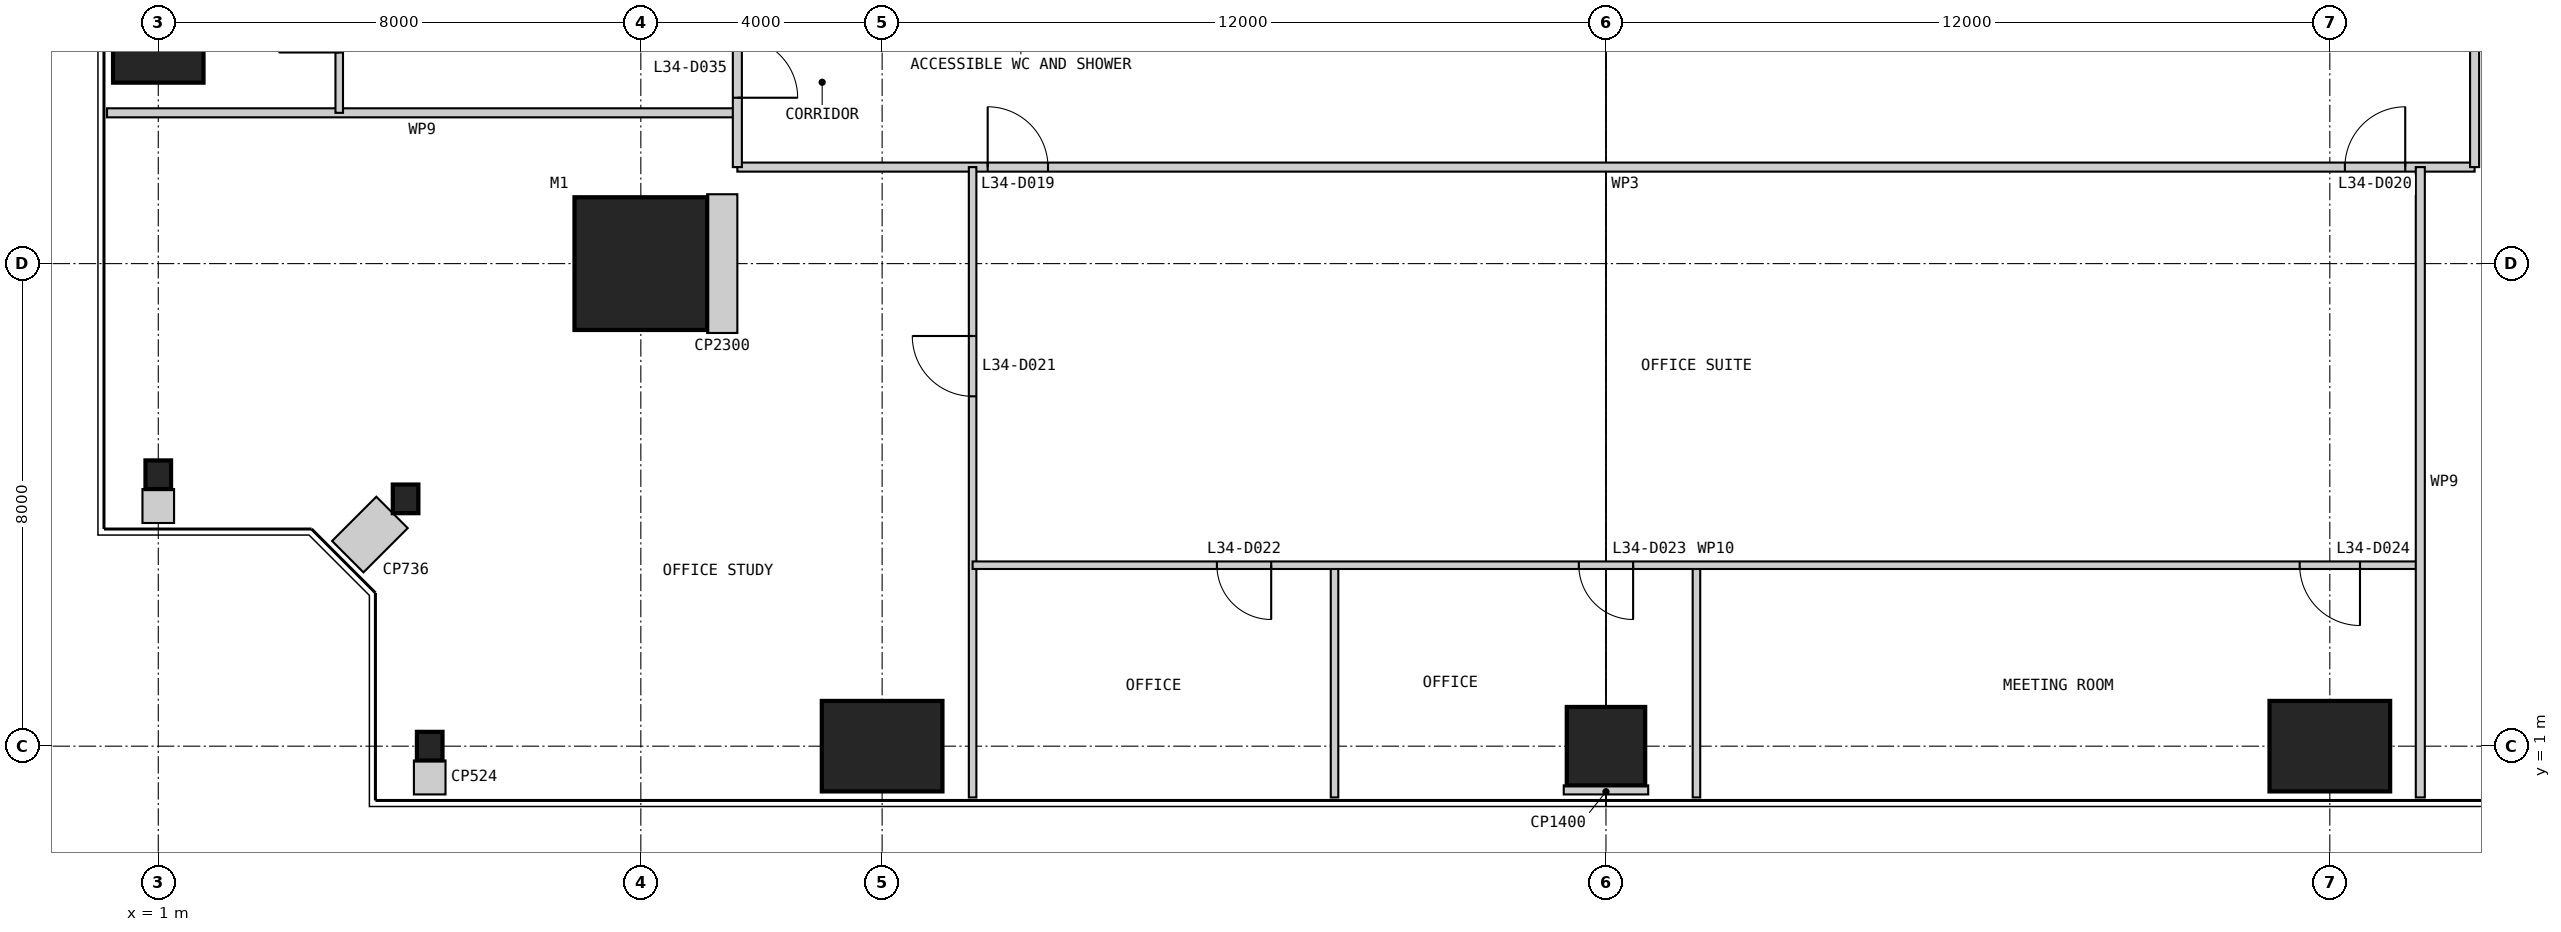
"""IFC4 building model, lengths in metres.
Left out: names, types, materials, properties, quantities, classifications, styles, units other than length and angle.
Written with IfcOpenShell. Run it as: python <this file> out.ifc"""

import sys

from ifc_helpers import new_model, si_unit, direction, frame, frame_2d, origin, origin_2d, place, context, subcontext, project, spatial, rectangle, i_section, extrude, element, fill, save


model = new_model("IFC4")
c1 = context("Model", 3, precision=1e-05, world=origin(), true_north=direction((0.0, 1.0)))
c2 = subcontext(c1, "Body", "Model", "MODEL_VIEW")
j1 = project(units=[si_unit("LENGTHUNIT", "METRE"), si_unit("PLANEANGLEUNIT", "RADIAN")], contexts=[c1])
p1 = place(None, origin())
s1 = spatial("IfcSite", under=j1, at=p1, CompositionType="ELEMENT")
p2 = place(p1, origin())
s2 = spatial("IfcBuilding", under=s1, at=p2, CompositionType="ELEMENT")
p3 = place(p2, frame((0.0, 0.0, 146.4)))
s3 = spatial("IfcBuildingStorey", under=s2, at=p3, CompositionType="ELEMENT", Elevation=146.4)
p4 = place(p3, frame((9.0, 9.0, 0.0), z_axis=(0.0, 0.0, 1.0), x_axis=(1.0, 0.0, 0.0)))
e1 = element("IfcColumn", 1, at=p4, inside=s3, PredefinedType="COLUMN", context=c2, shape_type="SweptSolid", body=[
    extrude(rectangle(XDim=2.2, YDim=2.2, at=origin_2d()), origin(), (0.0, 0.0, 1.0), 4.0),
])
p5 = place(p3, frame((5.5, 1.0, 0.0), z_axis=(0.0, 0.0, 1.0), x_axis=(1.0, 0.0, 0.0)))
e2 = element("IfcColumn", 2, at=p5, inside=s3, PredefinedType="COLUMN", context=c2, shape_type="SweptSolid", body=[
    extrude(i_section(OverallWidth=0.424, OverallDepth=0.475, WebThickness=0.048, FlangeThickness=0.077, at=origin_2d()), origin(), (0.0, 0.0, 1.0), 4.0),
])
p6 = place(p3, frame((13.0, 1.0, 0.0), z_axis=(0.0, 0.0, 1.0), x_axis=(1.0, 0.0, 0.0)))
e3 = element("IfcColumn", 3, at=p6, inside=s3, PredefinedType="COLUMN", context=c2, shape_type="SweptSolid", body=[
    extrude(rectangle(XDim=2.0, YDim=1.5, at=origin_2d()), origin(), (0.0, 0.0, 1.0), 4.0),
])
p7 = place(p3, frame((25.0, 1.0, 0.0), z_axis=(0.0, 0.0, 1.0), x_axis=(1.0, 0.0, 0.0)))
e4 = element("IfcColumn", 4, at=p7, inside=s3, PredefinedType="COLUMN", context=c2, shape_type="SweptSolid", body=[
    extrude(rectangle(XDim=1.3, YDim=1.3, at=origin_2d()), origin(), (0.0, 0.0, 1.0), 4.0),
])
p8 = place(p3, frame((37.0, 1.0, 0.0), z_axis=(0.0, 0.0, 1.0), x_axis=(1.0, 0.0, 0.0)))
e5 = element("IfcColumn", 5, at=p8, inside=s3, PredefinedType="COLUMN", context=c2, shape_type="SweptSolid", body=[
    extrude(rectangle(XDim=2.0, YDim=1.5, at=origin_2d()), origin(), (0.0, 0.0, 1.0), 4.0),
])
p9 = place(p3, frame((1.0, 13.0, 0.0), z_axis=(0.0, 0.0, 1.0), x_axis=(1.0, 0.0, 0.0)))
e6 = element("IfcColumn", 6, at=p9, inside=s3, PredefinedType="COLUMN", context=c2, shape_type="SweptSolid", body=[
    extrude(rectangle(XDim=1.5, YDim=2.0, at=origin_2d()), origin(), (0.0, 0.0, 1.0), 4.0),
])
for number, where, z_axis, x_axis in (
    (7, (1.0, 5.5, 0.0), (0.0, 0.0, 1.0), (1.0, 0.0, 0.0)),
    (8, (5.1, 5.1, 0.0), (0.0, 0.0, 1.0), (1.0, 0.0, 0.0)),
):
    element("IfcColumn", number, at=place(p3, frame(where, z_axis=z_axis, x_axis=x_axis)), inside=s3, PredefinedType="COLUMN", context=c2, shape_type="SweptSolid", body=[
        extrude(i_section(OverallWidth=0.424, OverallDepth=0.475, WebThickness=0.048, FlangeThickness=0.077, at=origin_2d()), origin(), (0.0, 0.0, 1.0), 4.0),
    ])
p10 = place(p3, frame((10.6, 10.6, 0.0), z_axis=(0.0, 0.0, 1.0), x_axis=(1.0, 0.0, 0.0)))
e9 = element("IfcWall", 9, at=p10, inside=s3, PredefinedType="PARTITIONING", context=c2, shape_type="SweptSolid", body=[
    extrude(rectangle(XDim=28.8, YDim=0.15, at=frame_2d((14.4, 0.0))), origin(), (0.0, 0.0, 1.0), 3.85),
])
p11 = place(p10, frame((4.15, 0.0, 0.0)))
e10 = element("IfcOpeningElement", 10, at=p11, cuts=e9, PredefinedType="OPENING", context=c2, shape_type="SweptSolid", body=[
    extrude(rectangle(XDim=1.0, YDim=2.2, at=frame_2d((0.5, 1.1))), frame((0.0, 0.085, 0.0), z_axis=(0.0, -1.0, 0.0), x_axis=(1.0, 0.0, 0.0)), (0.0, 0.0, 1.0), 0.17),
])
p12 = place(p10, frame((26.65, 0.0, 0.0)))
e11 = element("IfcOpeningElement", 11, at=p12, cuts=e9, PredefinedType="OPENING", context=c2, shape_type="SweptSolid", body=[
    extrude(rectangle(XDim=1.0, YDim=2.2, at=frame_2d((0.5, 1.1))), frame((0.0, 0.085, 0.0), z_axis=(0.0, -1.0, 0.0), x_axis=(1.0, 0.0, 0.0)), (0.0, 0.0, 1.0), 0.17),
])
p13 = place(p3, frame((0.15, 11.5, 0.0), z_axis=(0.0, 0.0, 1.0), x_axis=(1.0, 0.0, 0.0)))
e12 = element("IfcWall", 12, at=p13, inside=s3, PredefinedType="PARTITIONING", context=c2, shape_type="SweptSolid", body=[
    extrude(rectangle(XDim=10.45, YDim=0.15, at=frame_2d((5.225, 0.0))), origin(), (0.0, 0.0, 1.0), 3.85),
])
p14 = place(p3, frame((14.5, 0.15, 0.0), z_axis=(0.0, 0.0, 1.0), x_axis=(0.0, 1.0, 0.0)))
e13 = element("IfcWall", 13, at=p14, inside=s3, PredefinedType="PARTITIONING", context=c2, shape_type="SweptSolid", body=[
    extrude(rectangle(XDim=10.45, YDim=0.125, at=frame_2d((5.225, 0.0))), origin(), (0.0, 0.0, 1.0), 3.85),
])
p15 = place(p14, frame((6.65, 0.0, 0.0)))
e14 = element("IfcOpeningElement", 14, at=p15, cuts=e13, PredefinedType="OPENING", context=c2, shape_type="SweptSolid", body=[
    extrude(rectangle(XDim=1.0, YDim=2.2, at=frame_2d((0.5, 1.1))), frame((0.0, 0.073, 0.0), z_axis=(0.0, -1.0, 0.0), x_axis=(1.0, 0.0, 0.0)), (0.0, 0.0, 1.0), 0.145),
])
for number, where, z_axis, x_axis in (
    (15, (20.5, 0.15, 0.0), (0.0, 0.0, 1.0), (0.0, 1.0, 0.0)),
    (16, (26.5, 0.15, 0.0), (0.0, 0.0, 1.0), (0.0, 1.0, 0.0)),
):
    element("IfcWall", number, at=place(p3, frame(where, z_axis=z_axis, x_axis=x_axis)), inside=s3, PredefinedType="PARTITIONING", context=c2, shape_type="SweptSolid", body=[
        extrude(rectangle(XDim=3.85, YDim=0.125, at=frame_2d((1.925, 0.0))), origin(), (0.0, 0.0, 1.0), 3.85),
    ])
p16 = place(p3, frame((14.5, 4.0, 0.0), z_axis=(0.0, 0.0, 1.0), x_axis=(1.0, 0.0, 0.0)))
e17 = element("IfcWall", 17, at=p16, inside=s3, PredefinedType="PARTITIONING", context=c2, shape_type="SweptSolid", body=[
    extrude(rectangle(XDim=24.0, YDim=0.125, at=frame_2d((12.0, 0.0))), origin(), (0.0, 0.0, 1.0), 3.85),
])
p17 = place(p16, frame((4.05, 0.0, 0.0)))
e18 = element("IfcOpeningElement", 18, at=p17, cuts=e17, PredefinedType="OPENING", context=c2, shape_type="SweptSolid", body=[
    extrude(rectangle(XDim=0.9, YDim=2.2, at=frame_2d((0.45, 1.1))), frame((0.0, 0.073, 0.0), z_axis=(0.0, -1.0, 0.0), x_axis=(1.0, 0.0, 0.0)), (0.0, 0.0, 1.0), 0.145),
])
p18 = place(p16, frame((10.05, 0.0, 0.0)))
e19 = element("IfcOpeningElement", 19, at=p18, cuts=e17, PredefinedType="OPENING", context=c2, shape_type="SweptSolid", body=[
    extrude(rectangle(XDim=0.9, YDim=2.2, at=frame_2d((0.45, 1.1))), frame((0.0, 0.073, 0.0), z_axis=(0.0, -1.0, 0.0), x_axis=(1.0, 0.0, 0.0)), (0.0, 0.0, 1.0), 0.145),
])
p19 = place(p16, frame((22.0, 0.0, 0.0)))
e20 = element("IfcOpeningElement", 20, at=p19, cuts=e17, PredefinedType="OPENING", context=c2, shape_type="SweptSolid", body=[
    extrude(rectangle(XDim=1.0, YDim=2.2, at=frame_2d((0.5, 1.1))), frame((0.0, 0.073, 0.0), z_axis=(0.0, -1.0, 0.0), x_axis=(1.0, 0.0, 0.0)), (0.0, 0.0, 1.0), 0.145),
])
p20 = place(p3, frame((39.4, 10.6, 0.0), z_axis=(0.0, 0.0, 1.0), x_axis=(0.0, 1.0, 0.0)))
e21 = element("IfcWall", 21, at=p20, inside=s3, PredefinedType="PARTITIONING", context=c2, shape_type="SweptSolid", body=[
    extrude(rectangle(XDim=27.9, YDim=0.15, at=frame_2d((13.95, 0.0))), origin(), (0.0, 0.0, 1.0), 3.85),
])
p21 = place(p20, frame((4.15, 0.0, 0.0)))
e22 = element("IfcOpeningElement", 22, at=p21, cuts=e21, PredefinedType="OPENING", context=c2, shape_type="SweptSolid", body=[
    extrude(rectangle(XDim=1.0, YDim=2.2, at=frame_2d((0.5, 1.1))), frame((0.0, 0.085, 0.0), z_axis=(0.0, -1.0, 0.0), x_axis=(1.0, 0.0, 0.0)), (0.0, 0.0, 1.0), 0.17),
])
p22 = place(p20, frame((23.65, 0.0, 0.0)))
e23 = element("IfcOpeningElement", 23, at=p22, cuts=e21, PredefinedType="OPENING", context=c2, shape_type="SweptSolid", body=[
    extrude(rectangle(XDim=1.0, YDim=2.2, at=frame_2d((0.5, 1.1))), frame((0.0, 0.085, 0.0), z_axis=(0.0, -1.0, 0.0), x_axis=(1.0, 0.0, 0.0)), (0.0, 0.0, 1.0), 0.17),
])
p23 = place(p3, frame((38.5, 0.15, 0.0), z_axis=(0.0, 0.0, 1.0), x_axis=(0.0, 1.0, 0.0)))
e24 = element("IfcWall", 24, at=p23, inside=s3, PredefinedType="PARTITIONING", context=c2, shape_type="SweptSolid", body=[
    extrude(rectangle(XDim=10.45, YDim=0.15, at=frame_2d((5.225, 0.0))), origin(), (0.0, 0.0, 1.0), 3.85),
])
p24 = place(p3, frame((10.6, 38.5, 0.0), z_axis=(0.0, 0.0, 1.0), x_axis=(0.0, -1.0, 0.0)))
e25 = element("IfcWall", 25, at=p24, inside=s3, PredefinedType="PARTITIONING", context=c2, shape_type="SweptSolid", body=[
    extrude(rectangle(XDim=27.9, YDim=0.15, at=frame_2d((13.95, 0.0))), origin(), (0.0, 0.0, 1.0), 3.85),
])
p25 = place(p24, frame((3.25, 0.0, 0.0)))
e26 = element("IfcOpeningElement", 26, at=p25, cuts=e25, PredefinedType="OPENING", context=c2, shape_type="SweptSolid", body=[
    extrude(rectangle(XDim=1.0, YDim=2.2, at=frame_2d((0.5, 1.1))), frame((0.0, 0.085, 0.0), z_axis=(0.0, -1.0, 0.0), x_axis=(1.0, 0.0, 0.0)), (0.0, 0.0, 1.0), 0.17),
])
p26 = place(p24, frame((25.75, 0.0, 0.0)))
e27 = element("IfcOpeningElement", 27, at=p26, cuts=e25, PredefinedType="OPENING", context=c2, shape_type="SweptSolid", body=[
    extrude(rectangle(XDim=1.0, YDim=2.2, at=frame_2d((0.5, 1.1))), frame((0.0, 0.085, 0.0), z_axis=(0.0, -1.0, 0.0), x_axis=(1.0, 0.0, 0.0)), (0.0, 0.0, 1.0), 0.17),
])
p27 = place(p3, frame((4.0, 35.5, 0.0), z_axis=(0.0, 0.0, 1.0), x_axis=(0.0, -1.0, 0.0)))
e28 = element("IfcWall", 28, at=p27, inside=s3, PredefinedType="PARTITIONING", context=c2, shape_type="SweptSolid", body=[
    extrude(rectangle(XDim=24.0, YDim=0.125, at=frame_2d((12.0, 0.0))), origin(), (0.0, 0.0, 1.0), 3.238),
])
p28 = place(p27, frame((4.05, 0.0, 0.0)))
e29 = element("IfcOpeningElement", 29, at=p28, cuts=e28, PredefinedType="OPENING", context=c2, shape_type="SweptSolid", body=[
    extrude(rectangle(XDim=0.9, YDim=2.2, at=frame_2d((0.45, 1.1))), frame((0.0, 0.073, 0.0), z_axis=(0.0, -1.0, 0.0), x_axis=(1.0, 0.0, 0.0)), (0.0, 0.0, 1.0), 0.145),
])
p29 = place(p27, frame((10.05, 0.0, 0.0)))
e30 = element("IfcOpeningElement", 30, at=p29, cuts=e28, PredefinedType="OPENING", context=c2, shape_type="SweptSolid", body=[
    extrude(rectangle(XDim=0.9, YDim=2.2, at=frame_2d((0.45, 1.1))), frame((0.0, 0.073, 0.0), z_axis=(0.0, -1.0, 0.0), x_axis=(1.0, 0.0, 0.0)), (0.0, 0.0, 1.0), 0.145),
])
p30 = place(p27, frame((22.0, 0.0, 0.0)))
e31 = element("IfcOpeningElement", 31, at=p30, cuts=e28, PredefinedType="OPENING", context=c2, shape_type="SweptSolid", body=[
    extrude(rectangle(XDim=1.0, YDim=2.2, at=frame_2d((0.5, 1.1))), frame((0.0, 0.073, 0.0), z_axis=(0.0, -1.0, 0.0), x_axis=(1.0, 0.0, 0.0)), (0.0, 0.0, 1.0), 0.145),
])
p31 = place(p3, frame((10.6, 9.0, 0.0), z_axis=(0.0, 0.0, 1.0), x_axis=(-1.0, 0.0, 0.0)))
e32 = element("IfcWall", 32, at=p31, inside=s3, PredefinedType="PARTITIONING", context=c2, shape_type="SweptSolid", body=[
    extrude(rectangle(XDim=0.5, YDim=2.3, at=frame_2d((0.25, 0.0))), origin(), (0.0, 0.0, 1.0), 3.85),
])
for number, where, z_axis, x_axis in (
    (33, (5.5, 0.2, 0.0), (0.0, 0.0, 1.0), (0.0, 1.0, 0.0)),
    (34, (1.0, 4.7, 0.0), (0.0, 0.0, 1.0), (0.0, 1.0, 0.0)),
):
    element("IfcWall", number, at=place(p3, frame(where, z_axis=z_axis, x_axis=x_axis)), inside=s3, PredefinedType="PARTITIONING", context=c2, shape_type="SweptSolid", body=[
        extrude(rectangle(XDim=0.562, YDim=0.524, at=frame_2d((0.281, 0.0))), origin(), (0.0, 0.0, 1.0), 3.85),
    ])
p32 = place(p3, frame((4.141, 4.141, 0.0), z_axis=(0.0, 0.0, 1.0), x_axis=(0.707106781187, 0.707106781187, 0.0)))
e35 = element("IfcWall", 35, at=p32, inside=s3, PredefinedType="PARTITIONING", context=c2, shape_type="SweptSolid", body=[
    extrude(rectangle(XDim=1.038, YDim=0.736, at=frame_2d((0.519, 0.0))), origin(), (0.0, 0.0, 1.0), 3.85),
])
p33 = place(p3, frame((25.0, 0.2, 0.0), z_axis=(0.0, 0.0, 1.0), x_axis=(0.0, 1.0, 0.0)))
e36 = element("IfcWall", 36, at=p33, inside=s3, PredefinedType="PARTITIONING", context=c2, shape_type="SweptSolid", body=[
    extrude(rectangle(XDim=0.15, YDim=1.4, at=frame_2d((0.075, 0.0))), origin(), (0.0, 0.0, 1.0), 3.85),
])
p34 = place(p11, origin())
e37 = element("IfcDoor", 37, at=p34, inside=s3, OperationType="SINGLE_SWING_LEFT", PredefinedType="DOOR", context=c2, shape_type="SweptSolid", body=[
    extrude(rectangle(XDim=1.0, YDim=2.2, at=frame_2d((0.5, 1.1))), frame((0.0, 0.025, 0.0), z_axis=(0.0, -1.0, 0.0), x_axis=(1.0, 0.0, 0.0)), (0.0, 0.0, 1.0), 0.05),
])
fill(e10, e37)
p35 = place(p12, origin())
e38 = element("IfcDoor", 38, at=p35, inside=s3, OperationType="SINGLE_SWING_RIGHT", PredefinedType="DOOR", context=c2, shape_type="SweptSolid", body=[
    extrude(rectangle(XDim=1.0, YDim=2.2, at=frame_2d((0.5, 1.1))), frame((0.0, 0.025, 0.0), z_axis=(0.0, -1.0, 0.0), x_axis=(1.0, 0.0, 0.0)), (0.0, 0.0, 1.0), 0.05),
])
fill(e11, e38)
p36 = place(p15, origin())
e39 = element("IfcDoor", 39, at=p36, inside=s3, OperationType="SINGLE_SWING_RIGHT", PredefinedType="DOOR", context=c2, shape_type="SweptSolid", body=[
    extrude(rectangle(XDim=1.0, YDim=2.2, at=frame_2d((0.5, 1.1))), frame((0.0, 0.025, 0.0), z_axis=(0.0, -1.0, 0.0), x_axis=(1.0, 0.0, 0.0)), (0.0, 0.0, 1.0), 0.05),
])
fill(e14, e39)
p37 = place(p17, frame((0.9, 0.0, 0.0), z_axis=(0.0, 0.0, 1.0), x_axis=(-1.0, 0.0, 0.0)))
e40 = element("IfcDoor", 40, at=p37, inside=s3, OperationType="SINGLE_SWING_LEFT", PredefinedType="DOOR", context=c2, shape_type="SweptSolid", body=[
    extrude(rectangle(XDim=0.9, YDim=2.2, at=frame_2d((0.45, 1.1))), frame((0.0, 0.025, 0.0), z_axis=(0.0, -1.0, 0.0), x_axis=(1.0, 0.0, 0.0)), (0.0, 0.0, 1.0), 0.05),
])
fill(e18, e40)
p38 = place(p18, frame((0.9, 0.0, 0.0), z_axis=(0.0, 0.0, 1.0), x_axis=(-1.0, 0.0, 0.0)))
e41 = element("IfcDoor", 41, at=p38, inside=s3, OperationType="SINGLE_SWING_LEFT", PredefinedType="DOOR", context=c2, shape_type="SweptSolid", body=[
    extrude(rectangle(XDim=0.9, YDim=2.2, at=frame_2d((0.45, 1.1))), frame((0.0, 0.025, 0.0), z_axis=(0.0, -1.0, 0.0), x_axis=(1.0, 0.0, 0.0)), (0.0, 0.0, 1.0), 0.05),
])
fill(e19, e41)
p39 = place(p19, frame((1.0, 0.0, 0.0), z_axis=(0.0, 0.0, 1.0), x_axis=(-1.0, 0.0, 0.0)))
e42 = element("IfcDoor", 42, at=p39, inside=s3, OperationType="SINGLE_SWING_LEFT", PredefinedType="DOOR", context=c2, shape_type="SweptSolid", body=[
    extrude(rectangle(XDim=1.0, YDim=2.2, at=frame_2d((0.5, 1.1))), frame((0.0, 0.025, 0.0), z_axis=(0.0, -1.0, 0.0), x_axis=(1.0, 0.0, 0.0)), (0.0, 0.0, 1.0), 0.05),
])
fill(e20, e42)
p40 = place(p26, origin())
e43 = element("IfcDoor", 43, at=p40, inside=s3, OperationType="SINGLE_SWING_RIGHT", PredefinedType="DOOR", context=c2, shape_type="SweptSolid", body=[
    extrude(rectangle(XDim=1.0, YDim=2.2, at=frame_2d((0.5, 1.1))), frame((0.0, 0.025, 0.0), z_axis=(0.0, -1.0, 0.0), x_axis=(1.0, 0.0, 0.0)), (0.0, 0.0, 1.0), 0.05),
])
fill(e27, e43)
save(model, sys.argv[1])
